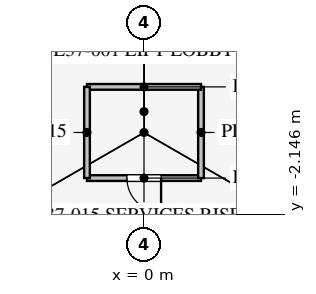
"""IFC4 building model, lengths in metres.
Left out: names, types, materials, properties, quantities, classifications, styles, units other than length and angle.
Written with IfcOpenShell. Run it as: python <this file> out.ifc"""

import sys

from ifc_helpers import new_model, si_unit, direction, frame, frame_2d, origin, place, context, subcontext, project, spatial, rectangle, extrude, element, fill, save


model = new_model("IFC4")
c1 = context("Model", 3, precision=1e-05, world=origin(), true_north=direction((0.0, 1.0)))
c2 = subcontext(c1, "Body", "Model", "MODEL_VIEW")
j1 = project(units=[si_unit("LENGTHUNIT", "METRE"), si_unit("PLANEANGLEUNIT", "RADIAN")], contexts=[c1])
p1 = place(None, origin())
s1 = spatial("IfcSite", under=j1, at=p1, CompositionType="ELEMENT")
p2 = place(p1, origin())
s2 = spatial("IfcBuilding", under=s1, at=p2, CompositionType="ELEMENT")
p3 = place(p2, frame((0.0, 0.0, 161.9)))
s3 = spatial("IfcBuildingStorey", under=s2, at=p3, CompositionType="ELEMENT", Elevation=161.9)
p4 = place(p3, frame((-1.5, -1.2, 0.0), z_axis=(0.0, 0.0, 1.0), x_axis=(1.0, 0.0, 0.0)))
e1 = element("IfcWall", 1, at=p4, inside=s3, PredefinedType="PARTITIONING", context=c2, shape_type="SweptSolid", body=[
    extrude(rectangle(XDim=3.0, YDim=0.15, at=frame_2d((1.5, 0.0))), origin(), (0.0, 0.0, 1.0), 4.0),
])
p5 = place(p4, frame((1.05, 0.0, 0.0)))
e2 = element("IfcOpeningElement", 2, at=p5, cuts=e1, PredefinedType="OPENING", context=c2, shape_type="SweptSolid", body=[
    extrude(rectangle(XDim=0.9, YDim=2.1, at=frame_2d((0.45, 1.05))), frame((0.0, 0.085, 0.0), z_axis=(0.0, -1.0, 0.0), x_axis=(1.0, 0.0, 0.0)), (0.0, 0.0, 1.0), 0.17),
])
p6 = place(p3, frame((1.5, -1.2, 0.0), z_axis=(0.0, 0.0, 1.0), x_axis=(0.0, 1.0, 0.0)))
e3 = element("IfcWall", 3, at=p6, inside=s3, PredefinedType="PARTITIONING", context=c2, shape_type="SweptSolid", body=[
    extrude(rectangle(XDim=2.4, YDim=0.15, at=frame_2d((1.2, 0.0))), origin(), (0.0, 0.0, 1.0), 4.0),
])
p7 = place(p3, frame((1.5, 1.2, 0.0), z_axis=(0.0, 0.0, 1.0), x_axis=(-1.0, 0.0, 0.0)))
e4 = element("IfcWall", 4, at=p7, inside=s3, PredefinedType="PARTITIONING", context=c2, shape_type="SweptSolid", body=[
    extrude(rectangle(XDim=3.0, YDim=0.15, at=frame_2d((1.5, 0.0))), origin(), (0.0, 0.0, 1.0), 4.0),
])
p8 = place(p3, frame((-1.5, 1.2, 0.0), z_axis=(0.0, 0.0, 1.0), x_axis=(0.0, -1.0, 0.0)))
e5 = element("IfcWall", 5, at=p8, inside=s3, PredefinedType="PARTITIONING", context=c2, shape_type="SweptSolid", body=[
    extrude(rectangle(XDim=2.4, YDim=0.15, at=frame_2d((1.2, 0.0))), origin(), (0.0, 0.0, 1.0), 4.0),
])
p9 = place(p3, frame((26.415, -15.231, 0.0), z_axis=(0.0, 0.0, 1.0), x_axis=(-0.50000091641, 0.866024874695, 0.0)))
e6 = element("IfcWall", 6, at=p9, inside=s3, PredefinedType="PARTITIONING", context=c2, shape_type="SweptSolid", body=[
    extrude(rectangle(XDim=52.796, YDim=0.12, at=frame_2d((26.398, 0.0))), origin(), (0.0, 0.0, 1.0), 2.9),
])
p10 = place(p9, frame((10.2, 0.0, 0.15)))
e7 = element("IfcOpeningElement", 7, at=p10, cuts=e6, PredefinedType="OPENING", context=c2, shape_type="SweptSolid", body=[
    extrude(rectangle(XDim=1.8, YDim=2.1, at=frame_2d((0.9, 1.05))), frame((0.0, 0.07, 0.0), z_axis=(0.0, -1.0, 0.0), x_axis=(1.0, 0.0, 0.0)), (0.0, 0.0, 1.0), 0.14),
])
p11 = place(p9, frame((40.8, 0.0, 0.15)))
e8 = element("IfcOpeningElement", 8, at=p11, cuts=e6, PredefinedType="OPENING", context=c2, shape_type="SweptSolid", body=[
    extrude(rectangle(XDim=1.8, YDim=2.1, at=frame_2d((0.9, 1.05))), frame((0.0, 0.07, 0.0), z_axis=(0.0, -1.0, 0.0), x_axis=(1.0, 0.0, 0.0)), (0.0, 0.0, 1.0), 0.14),
])
p12 = place(p3, frame((-0.016, 30.491, 0.0), z_axis=(0.0, 0.0, 1.0), x_axis=(-0.50000091641, -0.866024874695, 0.0)))
e9 = element("IfcWall", 9, at=p12, inside=s3, PredefinedType="PARTITIONING", context=c2, shape_type="SweptSolid", body=[
    extrude(rectangle(XDim=52.796, YDim=0.12, at=frame_2d((26.398, 0.0))), origin(), (0.0, 0.0, 1.0), 2.9),
])
p13 = place(p12, frame((10.2, 0.0, 0.15)))
e10 = element("IfcOpeningElement", 10, at=p13, cuts=e9, PredefinedType="OPENING", context=c2, shape_type="SweptSolid", body=[
    extrude(rectangle(XDim=1.8, YDim=2.1, at=frame_2d((0.9, 1.05))), frame((0.0, 0.07, 0.0), z_axis=(0.0, -1.0, 0.0), x_axis=(1.0, 0.0, 0.0)), (0.0, 0.0, 1.0), 0.14),
])
p14 = place(p12, frame((40.8, 0.0, 0.15)))
e11 = element("IfcOpeningElement", 11, at=p14, cuts=e9, PredefinedType="OPENING", context=c2, shape_type="SweptSolid", body=[
    extrude(rectangle(XDim=1.8, YDim=2.1, at=frame_2d((0.9, 1.05))), frame((0.0, 0.07, 0.0), z_axis=(0.0, -1.0, 0.0), x_axis=(1.0, 0.0, 0.0)), (0.0, 0.0, 1.0), 0.14),
])
p15 = place(p5, frame((0.9, 0.0, 0.0), z_axis=(0.0, 0.0, 1.0), x_axis=(-1.0, 0.0, 0.0)))
e12 = element("IfcDoor", 12, at=p15, inside=s3, OperationType="SINGLE_SWING_LEFT", PredefinedType="DOOR", context=c2, shape_type="SweptSolid", body=[
    extrude(rectangle(XDim=0.9, YDim=2.1, at=frame_2d((0.45, 1.05))), frame((0.0, 0.025, 0.0), z_axis=(0.0, -1.0, 0.0), x_axis=(1.0, 0.0, 0.0)), (0.0, 0.0, 1.0), 0.05),
])
fill(e2, e12)
save(model, sys.argv[1])
